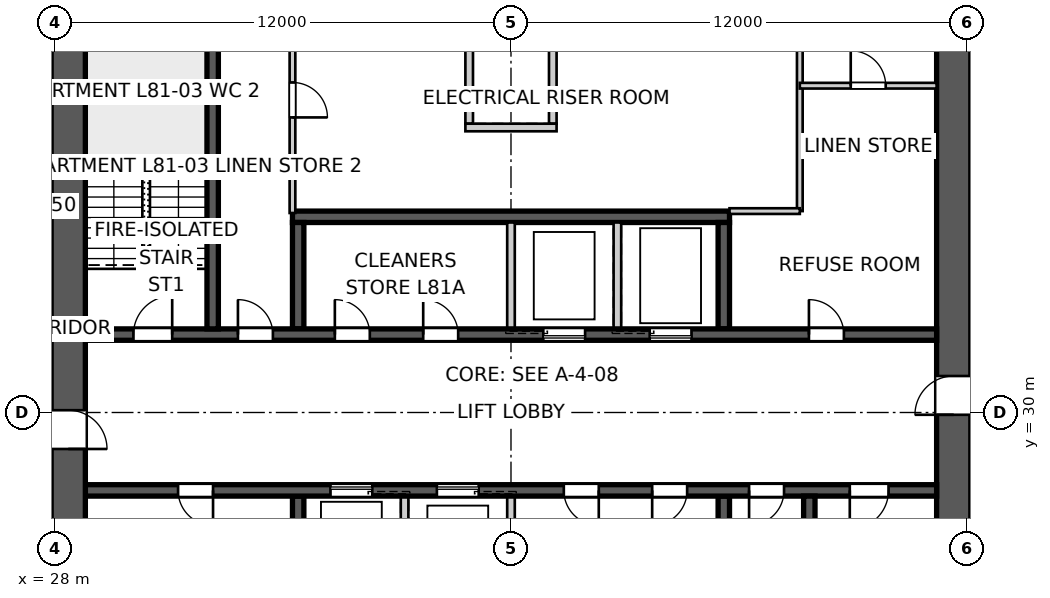
"""IFC4 building model, lengths in metres.
Left out: names, types, materials, properties, quantities, classifications, styles, units other than length and angle.
Written with IfcOpenShell. Run it as: python <this file> out.ifc"""

import sys

from ifc_helpers import new_model, si_unit, direction, frame, frame_2d, origin, place, context, subcontext, project, spatial, polyline, rectangle, outline, extrude, element, fill, save


model = new_model("IFC4")
c1 = context("Model", 3, precision=1e-05, world=origin(), true_north=direction((0.0, 1.0)))
c2 = subcontext(c1, "Body", "Model", "MODEL_VIEW")
j1 = project(units=[si_unit("LENGTHUNIT", "METRE"), si_unit("PLANEANGLEUNIT", "RADIAN")], contexts=[c1])
p1 = place(None, origin())
s1 = spatial("IfcSite", under=j1, at=p1, CompositionType="ELEMENT")
p2 = place(p1, origin())
s2 = spatial("IfcBuilding", under=s1, at=p2, CompositionType="ELEMENT")
p3 = place(p2, frame((0.0, 0.0, 293.0)))
s3 = spatial("IfcBuildingStorey", under=s2, at=p3, CompositionType="ELEMENT", Elevation=293.0)
p4 = place(p3, frame((51.65, 18.8, 0.0), z_axis=(0.0, 0.0, 1.0), x_axis=(0.0, 1.0, 0.0)))
e1 = element("IfcWall", 1, at=p4, inside=s3, PredefinedType="SHEAR", context=c2, shape_type="SweptSolid", body=[
    extrude(outline(polyline([(0.0, -0.45), (22.4, -0.45), (22.4, -0.025), (22.85, -0.025), (22.85, 0.025), (22.4, 0.025), (22.4, 0.45), (0.0, 0.45), (0.0, 0.025), (-0.45, 0.025), (-0.45, -0.025), (0.0, -0.025), (0.0, -0.45)])), origin(), (0.0, 0.0, 1.0), 3.4),
])
p5 = place(p4, frame((11.14, 0.0, 0.0)))
e2 = element("IfcOpeningElement", 2, at=p5, cuts=e1, PredefinedType="OPENING", context=c2, shape_type="SweptSolid", body=[
    extrude(rectangle(XDim=1.02, YDim=2.4, at=frame_2d((0.51, 1.2))), frame((0.0, 0.46, 0.0), z_axis=(0.0, -1.0, 0.0), x_axis=(1.0, 0.0, 0.0)), (0.0, 0.0, 1.0), 0.92),
])
p6 = place(p3, frame((28.35, 41.2, 0.0), z_axis=(0.0, 0.0, 1.0), x_axis=(0.0, -1.0, 0.0)))
e3 = element("IfcWall", 3, at=p6, inside=s3, PredefinedType="SHEAR", context=c2, shape_type="SweptSolid", body=[
    extrude(outline(polyline([(0.0, -0.45), (22.4, -0.45), (22.4, -0.025), (22.85, -0.025), (22.85, 0.025), (22.4, 0.025), (22.4, 0.45), (0.0, 0.45), (0.0, 0.025), (-0.45, 0.025), (-0.45, -0.025), (0.0, -0.025), (0.0, -0.45)])), origin(), (0.0, 0.0, 1.0), 3.4),
])
p7 = place(p6, frame((11.14, 0.0, 0.0)))
e4 = element("IfcOpeningElement", 4, at=p7, cuts=e3, PredefinedType="OPENING", context=c2, shape_type="SweptSolid", body=[
    extrude(rectangle(XDim=1.02, YDim=2.4, at=frame_2d((0.51, 1.2))), frame((0.0, 0.46, 0.0), z_axis=(0.0, -1.0, 0.0), x_axis=(1.0, 0.0, 0.0)), (0.0, 0.0, 1.0), 0.92),
])
p8 = place(p3, frame((28.8, 32.05, 0.0), z_axis=(0.0, 0.0, 1.0), x_axis=(1.0, 0.0, 0.0)))
e5 = element("IfcWall", 5, at=p8, inside=s3, PredefinedType="SHEAR", context=c2, shape_type="SweptSolid", body=[
    extrude(rectangle(XDim=22.4, YDim=0.3, at=frame_2d((11.2, 0.0))), origin(), (0.0, 0.0, 1.0), 3.4),
])
p9 = place(p8, frame((19.04, 0.0, 0.0)))
e6 = element("IfcOpeningElement", 6, at=p9, cuts=e5, PredefinedType="OPENING", context=c2, shape_type="SweptSolid", body=[
    extrude(rectangle(XDim=0.92, YDim=2.1, at=frame_2d((0.46, 1.05))), frame((0.0, 0.16, 0.0), z_axis=(0.0, -1.0, 0.0), x_axis=(1.0, 0.0, 0.0)), (0.0, 0.0, 1.0), 0.32),
])
p10 = place(p8, frame((1.265, 0.0, 0.0)))
e7 = element("IfcOpeningElement", 7, at=p10, cuts=e5, PredefinedType="OPENING", context=c2, shape_type="SweptSolid", body=[
    extrude(rectangle(XDim=1.02, YDim=2.1, at=frame_2d((0.51, 1.05))), frame((0.0, 0.16, 0.0), z_axis=(0.0, -1.0, 0.0), x_axis=(1.0, 0.0, 0.0)), (0.0, 0.0, 1.0), 0.32),
])
p11 = place(p8, frame((4.015, 0.0, 0.0)))
e8 = element("IfcOpeningElement", 8, at=p11, cuts=e5, PredefinedType="OPENING", context=c2, shape_type="SweptSolid", body=[
    extrude(rectangle(XDim=0.92, YDim=2.1, at=frame_2d((0.46, 1.05))), frame((0.0, 0.16, 0.0), z_axis=(0.0, -1.0, 0.0), x_axis=(1.0, 0.0, 0.0)), (0.0, 0.0, 1.0), 0.32),
])
p12 = place(p8, frame((6.565, 0.0, 0.0)))
e9 = element("IfcOpeningElement", 9, at=p12, cuts=e5, PredefinedType="OPENING", context=c2, shape_type="SweptSolid", body=[
    extrude(rectangle(XDim=0.92, YDim=2.1, at=frame_2d((0.46, 1.05))), frame((0.0, 0.16, 0.0), z_axis=(0.0, -1.0, 0.0), x_axis=(1.0, 0.0, 0.0)), (0.0, 0.0, 1.0), 0.32),
])
p13 = place(p8, frame((8.89, 0.0, 0.0)))
e10 = element("IfcOpeningElement", 10, at=p13, cuts=e5, PredefinedType="OPENING", context=c2, shape_type="SweptSolid", body=[
    extrude(rectangle(XDim=0.92, YDim=2.1, at=frame_2d((0.46, 1.05))), frame((0.0, 0.16, 0.0), z_axis=(0.0, -1.0, 0.0), x_axis=(1.0, 0.0, 0.0)), (0.0, 0.0, 1.0), 0.32),
])
p14 = place(p8, frame((12.05, 0.0, 0.0)))
e11 = element("IfcOpeningElement", 11, at=p14, cuts=e5, PredefinedType="OPENING", context=c2, shape_type="SweptSolid", body=[
    extrude(rectangle(XDim=1.1, YDim=2.1, at=frame_2d((0.55, 1.05))), frame((0.0, 0.16, 0.0), z_axis=(0.0, -1.0, 0.0), x_axis=(1.0, 0.0, 0.0)), (0.0, 0.0, 1.0), 0.32),
])
p15 = place(p8, frame((14.85, 0.0, 0.0)))
e12 = element("IfcOpeningElement", 12, at=p15, cuts=e5, PredefinedType="OPENING", context=c2, shape_type="SweptSolid", body=[
    extrude(rectangle(XDim=1.1, YDim=2.1, at=frame_2d((0.55, 1.05))), frame((0.0, 0.16, 0.0), z_axis=(0.0, -1.0, 0.0), x_axis=(1.0, 0.0, 0.0)), (0.0, 0.0, 1.0), 0.32),
])
p16 = place(p3, frame((51.2, 27.95, 0.0), z_axis=(0.0, 0.0, 1.0), x_axis=(-1.0, 0.0, 0.0)))
e13 = element("IfcWall", 13, at=p16, inside=s3, PredefinedType="SHEAR", context=c2, shape_type="SweptSolid", body=[
    extrude(rectangle(XDim=22.4, YDim=0.3, at=frame_2d((11.2, 0.0))), origin(), (0.0, 0.0, 1.0), 3.4),
])
p17 = place(p16, frame((19.04, 0.0, 0.0)))
e14 = element("IfcOpeningElement", 14, at=p17, cuts=e13, PredefinedType="OPENING", context=c2, shape_type="SweptSolid", body=[
    extrude(rectangle(XDim=0.92, YDim=2.1, at=frame_2d((0.46, 1.05))), frame((0.0, 0.16, 0.0), z_axis=(0.0, -1.0, 0.0), x_axis=(1.0, 0.0, 0.0)), (0.0, 0.0, 1.0), 0.32),
])
p18 = place(p16, frame((1.265, 0.0, 0.0)))
e15 = element("IfcOpeningElement", 15, at=p18, cuts=e13, PredefinedType="OPENING", context=c2, shape_type="SweptSolid", body=[
    extrude(rectangle(XDim=1.02, YDim=2.1, at=frame_2d((0.51, 1.05))), frame((0.0, 0.16, 0.0), z_axis=(0.0, -1.0, 0.0), x_axis=(1.0, 0.0, 0.0)), (0.0, 0.0, 1.0), 0.32),
])
p19 = place(p16, frame((4.015, 0.0, 0.0)))
e16 = element("IfcOpeningElement", 16, at=p19, cuts=e13, PredefinedType="OPENING", context=c2, shape_type="SweptSolid", body=[
    extrude(rectangle(XDim=0.92, YDim=2.1, at=frame_2d((0.46, 1.05))), frame((0.0, 0.16, 0.0), z_axis=(0.0, -1.0, 0.0), x_axis=(1.0, 0.0, 0.0)), (0.0, 0.0, 1.0), 0.32),
])
p20 = place(p16, frame((8.89, 0.0, 0.0)))
e17 = element("IfcOpeningElement", 17, at=p20, cuts=e13, PredefinedType="OPENING", context=c2, shape_type="SweptSolid", body=[
    extrude(rectangle(XDim=0.92, YDim=2.1, at=frame_2d((0.46, 1.05))), frame((0.0, 0.16, 0.0), z_axis=(0.0, -1.0, 0.0), x_axis=(1.0, 0.0, 0.0)), (0.0, 0.0, 1.0), 0.32),
])
p21 = place(p16, frame((6.565, 0.0, 0.0)))
e18 = element("IfcOpeningElement", 18, at=p21, cuts=e13, PredefinedType="OPENING", context=c2, shape_type="SweptSolid", body=[
    extrude(rectangle(XDim=0.92, YDim=2.1, at=frame_2d((0.46, 1.05))), frame((0.0, 0.16, 0.0), z_axis=(0.0, -1.0, 0.0), x_axis=(1.0, 0.0, 0.0)), (0.0, 0.0, 1.0), 0.32),
])
p22 = place(p16, frame((12.05, 0.0, 0.0)))
e19 = element("IfcOpeningElement", 19, at=p22, cuts=e13, PredefinedType="OPENING", context=c2, shape_type="SweptSolid", body=[
    extrude(rectangle(XDim=1.1, YDim=2.1, at=frame_2d((0.55, 1.05))), frame((0.0, 0.16, 0.0), z_axis=(0.0, -1.0, 0.0), x_axis=(1.0, 0.0, 0.0)), (0.0, 0.0, 1.0), 0.32),
])
p23 = place(p16, frame((14.85, 0.0, 0.0)))
e20 = element("IfcOpeningElement", 20, at=p23, cuts=e13, PredefinedType="OPENING", context=c2, shape_type="SweptSolid", body=[
    extrude(rectangle(XDim=1.1, YDim=2.1, at=frame_2d((0.55, 1.05))), frame((0.0, 0.16, 0.0), z_axis=(0.0, -1.0, 0.0), x_axis=(1.0, 0.0, 0.0)), (0.0, 0.0, 1.0), 0.32),
])
p24 = place(p3, frame((34.25, 35.15, 0.0), z_axis=(0.0, 0.0, 1.0), x_axis=(1.0, 0.0, 0.0)))
e21 = element("IfcWall", 21, at=p24, inside=s3, PredefinedType="SHEAR", context=c2, shape_type="SweptSolid", body=[
    extrude(rectangle(XDim=11.5, YDim=0.3, at=frame_2d((5.75, 0.0))), origin(), (0.0, 0.0, 1.0), 3.4),
])
for number, where, z_axis, x_axis in (
    (22, (34.4, 32.2, 0.0), (0.0, 0.0, 1.0), (0.0, 1.0, 0.0)),
    (23, (45.6, 27.8, 0.0), (0.0, 0.0, 1.0), (0.0, -1.0, 0.0)),
):
    element("IfcWall", number, at=place(p3, frame(where, z_axis=z_axis, x_axis=x_axis)), inside=s3, PredefinedType="SHEAR", context=c2, shape_type="SweptSolid", body=[
        extrude(rectangle(XDim=2.8, YDim=0.3, at=frame_2d((1.4, 0.0))), origin(), (0.0, 0.0, 1.0), 3.4),
    ])
for number, where, z_axis, x_axis in (
    (24, (40.0, 32.2, 0.0), (0.0, 0.0, 1.0), (0.0, 1.0, 0.0)),
    (25, (40.0, 27.8, 0.0), (0.0, 0.0, 1.0), (0.0, -1.0, 0.0)),
    (26, (42.8, 32.2, 0.0), (0.0, 0.0, 1.0), (0.0, 1.0, 0.0)),
    (27, (37.2, 27.8, 0.0), (0.0, 0.0, 1.0), (0.0, -1.0, 0.0)),
):
    element("IfcWall", number, at=place(p3, frame(where, z_axis=z_axis, x_axis=x_axis)), inside=s3, PredefinedType="SOLIDWALL", context=c2, shape_type="SweptSolid", body=[
        extrude(rectangle(XDim=2.8, YDim=0.2, at=frame_2d((1.4, 0.0))), origin(), (0.0, 0.0, 1.0), 3.4),
    ])
for number, where, z_axis, x_axis in (
    (28, (45.6, 32.2, 0.0), (0.0, 0.0, 1.0), (0.0, 1.0, 0.0)),
    (29, (34.4, 27.8, 0.0), (0.0, 0.0, 1.0), (0.0, -1.0, 0.0)),
):
    element("IfcWall", number, at=place(p3, frame(where, z_axis=z_axis, x_axis=x_axis)), inside=s3, PredefinedType="SHEAR", context=c2, shape_type="SweptSolid", body=[
        extrude(rectangle(XDim=2.8, YDim=0.3, at=frame_2d((1.4, 0.0))), origin(), (0.0, 0.0, 1.0), 3.4),
    ])
for number, where, z_axis, x_axis in (
    (30, (32.15, 32.2, 0.0), (0.0, 0.0, 1.0), (0.0, 1.0, 0.0)),
    (31, (47.85, 27.8, 0.0), (0.0, 0.0, 1.0), (0.0, -1.0, 0.0)),
):
    element("IfcWall", number, at=place(p3, frame(where, z_axis=z_axis, x_axis=x_axis)), inside=s3, PredefinedType="SHEAR", context=c2, shape_type="SweptSolid", body=[
        extrude(rectangle(XDim=7.7, YDim=0.3, at=frame_2d((3.85, 0.0))), origin(), (0.0, 0.0, 1.0), 3.4),
    ])
for number, where, z_axis, x_axis in (
    (32, (38.9, 37.6, 0.0), (0.0, 0.0, 1.0), (0.0, 1.0, 0.0)),
    (33, (41.1, 37.6, 0.0), (0.0, 0.0, 1.0), (0.0, 1.0, 0.0)),
):
    element("IfcWall", number, at=place(p3, frame(where, z_axis=z_axis, x_axis=x_axis)), inside=s3, PredefinedType="SOLIDWALL", context=c2, shape_type="SweptSolid", body=[
        extrude(rectangle(XDim=2.0, YDim=0.2, at=frame_2d((1.0, 0.0))), origin(), (0.0, 0.0, 1.0), 3.4),
    ])
p25 = place(p3, frame((38.8, 37.5, 0.0), z_axis=(0.0, 0.0, 1.0), x_axis=(1.0, 0.0, 0.0)))
e34 = element("IfcWall", 34, at=p25, inside=s3, PredefinedType="SOLIDWALL", context=c2, shape_type="SweptSolid", body=[
    extrude(rectangle(XDim=2.4, YDim=0.2, at=frame_2d((1.2, 0.0))), origin(), (0.0, 0.0, 1.0), 3.4),
])
p26 = place(p3, frame((34.25, 41.2, 0.0), z_axis=(0.0, 0.0, 1.0), x_axis=(0.0, -1.0, 0.0)))
e35 = element("IfcWall", 35, at=p26, inside=s3, PredefinedType="SOLIDWALL", context=c2, shape_type="SweptSolid", body=[
    extrude(rectangle(XDim=5.95, YDim=0.15, at=frame_2d((2.975, 0.0))), origin(), (0.0, 0.0, 1.0), 3.25),
])
p27 = place(p26, frame((2.515, 0.0, 0.0)))
e36 = element("IfcOpeningElement", 36, at=p27, cuts=e35, PredefinedType="OPENING", context=c2, shape_type="SweptSolid", body=[
    extrude(rectangle(XDim=0.92, YDim=2.1, at=frame_2d((0.46, 1.05))), frame((0.0, 0.085, 0.0), z_axis=(0.0, -1.0, 0.0), x_axis=(1.0, 0.0, 0.0)), (0.0, 0.0, 1.0), 0.17),
])
p28 = place(p3, frame((47.6, 41.2, 0.0), z_axis=(0.0, 0.0, 1.0), x_axis=(0.0, -1.0, 0.0)))
e37 = element("IfcWall", 37, at=p28, inside=s3, PredefinedType="SOLIDWALL", context=c2, shape_type="SweptSolid", body=[
    extrude(rectangle(XDim=5.9, YDim=0.15, at=frame_2d((2.95, 0.0))), origin(), (0.0, 0.0, 1.0), 3.25),
])
p29 = place(p3, frame((47.6, 35.3, 0.0), z_axis=(0.0, 0.0, 1.0), x_axis=(-1.0, 0.0, 0.0)))
e38 = element("IfcWall", 38, at=p29, inside=s3, PredefinedType="SOLIDWALL", context=c2, shape_type="SweptSolid", body=[
    extrude(rectangle(XDim=1.85, YDim=0.15, at=frame_2d((0.925, 0.0))), origin(), (0.0, 0.0, 1.0), 3.25),
])
p30 = place(p3, frame((47.6, 38.6, 0.0), z_axis=(0.0, 0.0, 1.0), x_axis=(1.0, 0.0, 0.0)))
e39 = element("IfcWall", 39, at=p30, inside=s3, PredefinedType="SOLIDWALL", context=c2, shape_type="SweptSolid", body=[
    extrude(rectangle(XDim=3.6, YDim=0.15, at=frame_2d((1.8, 0.0))), origin(), (0.0, 0.0, 1.0), 3.25),
])
p31 = place(p30, frame((1.34, 0.0, 0.0)))
e40 = element("IfcOpeningElement", 40, at=p31, cuts=e39, PredefinedType="OPENING", context=c2, shape_type="SweptSolid", body=[
    extrude(rectangle(XDim=0.92, YDim=2.1, at=frame_2d((0.46, 1.05))), frame((0.0, 0.085, 0.0), z_axis=(0.0, -1.0, 0.0), x_axis=(1.0, 0.0, 0.0)), (0.0, 0.0, 1.0), 0.17),
])
p32 = place(p9, origin())
e41 = element("IfcDoor", 41, at=p32, inside=s3, OperationType="SINGLE_SWING_LEFT", PredefinedType="DOOR", context=c2, shape_type="SweptSolid", body=[
    extrude(rectangle(XDim=0.92, YDim=2.1, at=frame_2d((0.46, 1.05))), frame((0.0, 0.025, 0.0), z_axis=(0.0, -1.0, 0.0), x_axis=(1.0, 0.0, 0.0)), (0.0, 0.0, 1.0), 0.05),
])
fill(e6, e41)
p33 = place(p17, origin())
e42 = element("IfcDoor", 42, at=p33, inside=s3, OperationType="SINGLE_SWING_LEFT", PredefinedType="DOOR", context=c2, shape_type="SweptSolid", body=[
    extrude(rectangle(XDim=0.92, YDim=2.1, at=frame_2d((0.46, 1.05))), frame((0.0, 0.025, 0.0), z_axis=(0.0, -1.0, 0.0), x_axis=(1.0, 0.0, 0.0)), (0.0, 0.0, 1.0), 0.05),
])
fill(e14, e42)
p34 = place(p18, origin())
e43 = element("IfcDoor", 43, at=p34, inside=s3, OperationType="SINGLE_SWING_RIGHT", PredefinedType="DOOR", context=c2, shape_type="SweptSolid", body=[
    extrude(rectangle(XDim=1.02, YDim=2.1, at=frame_2d((0.51, 1.05))), frame((0.0, 0.025, 0.0), z_axis=(0.0, -1.0, 0.0), x_axis=(1.0, 0.0, 0.0)), (0.0, 0.0, 1.0), 0.05),
])
fill(e15, e43)
p35 = place(p10, origin())
e44 = element("IfcDoor", 44, at=p35, inside=s3, OperationType="SINGLE_SWING_RIGHT", PredefinedType="DOOR", context=c2, shape_type="SweptSolid", body=[
    extrude(rectangle(XDim=1.02, YDim=2.1, at=frame_2d((0.51, 1.05))), frame((0.0, 0.025, 0.0), z_axis=(0.0, -1.0, 0.0), x_axis=(1.0, 0.0, 0.0)), (0.0, 0.0, 1.0), 0.05),
])
fill(e7, e44)
p36 = place(p11, origin())
e45 = element("IfcDoor", 45, at=p36, inside=s3, OperationType="SINGLE_SWING_LEFT", PredefinedType="DOOR", context=c2, shape_type="SweptSolid", body=[
    extrude(rectangle(XDim=0.92, YDim=2.1, at=frame_2d((0.46, 1.05))), frame((0.0, 0.025, 0.0), z_axis=(0.0, -1.0, 0.0), x_axis=(1.0, 0.0, 0.0)), (0.0, 0.0, 1.0), 0.05),
])
fill(e8, e45)
p37 = place(p19, origin())
e46 = element("IfcDoor", 46, at=p37, inside=s3, OperationType="SINGLE_SWING_RIGHT", PredefinedType="DOOR", context=c2, shape_type="SweptSolid", body=[
    extrude(rectangle(XDim=0.92, YDim=2.1, at=frame_2d((0.46, 1.05))), frame((0.0, 0.025, 0.0), z_axis=(0.0, -1.0, 0.0), x_axis=(1.0, 0.0, 0.0)), (0.0, 0.0, 1.0), 0.05),
])
fill(e16, e46)
p38 = place(p31, origin())
e47 = element("IfcDoor", 47, at=p38, inside=s3, OperationType="SINGLE_SWING_LEFT", PredefinedType="DOOR", context=c2, shape_type="SweptSolid", body=[
    extrude(rectangle(XDim=0.92, YDim=2.1, at=frame_2d((0.46, 1.05))), frame((0.0, 0.025, 0.0), z_axis=(0.0, -1.0, 0.0), x_axis=(1.0, 0.0, 0.0)), (0.0, 0.0, 1.0), 0.05),
])
fill(e40, e47)
p39 = place(p27, origin())
e48 = element("IfcDoor", 48, at=p39, inside=s3, OperationType="SINGLE_SWING_RIGHT", PredefinedType="DOOR", context=c2, shape_type="SweptSolid", body=[
    extrude(rectangle(XDim=0.92, YDim=2.1, at=frame_2d((0.46, 1.05))), frame((0.0, 0.025, 0.0), z_axis=(0.0, -1.0, 0.0), x_axis=(1.0, 0.0, 0.0)), (0.0, 0.0, 1.0), 0.05),
])
fill(e36, e48)
p40 = place(p12, origin())
e49 = element("IfcDoor", 49, at=p40, inside=s3, OperationType="SINGLE_SWING_LEFT", PredefinedType="DOOR", context=c2, shape_type="SweptSolid", body=[
    extrude(rectangle(XDim=0.92, YDim=2.1, at=frame_2d((0.46, 1.05))), frame((0.0, 0.025, 0.0), z_axis=(0.0, -1.0, 0.0), x_axis=(1.0, 0.0, 0.0)), (0.0, 0.0, 1.0), 0.05),
])
fill(e9, e49)
p41 = place(p13, origin())
e50 = element("IfcDoor", 50, at=p41, inside=s3, OperationType="SINGLE_SWING_LEFT", PredefinedType="DOOR", context=c2, shape_type="SweptSolid", body=[
    extrude(rectangle(XDim=0.92, YDim=2.1, at=frame_2d((0.46, 1.05))), frame((0.0, 0.025, 0.0), z_axis=(0.0, -1.0, 0.0), x_axis=(1.0, 0.0, 0.0)), (0.0, 0.0, 1.0), 0.05),
])
fill(e10, e50)
p42 = place(p20, origin())
e51 = element("IfcDoor", 51, at=p42, inside=s3, OperationType="SINGLE_SWING_LEFT", PredefinedType="DOOR", context=c2, shape_type="SweptSolid", body=[
    extrude(rectangle(XDim=0.92, YDim=2.1, at=frame_2d((0.46, 1.05))), frame((0.0, 0.025, 0.0), z_axis=(0.0, -1.0, 0.0), x_axis=(1.0, 0.0, 0.0)), (0.0, 0.0, 1.0), 0.05),
])
fill(e17, e51)
p43 = place(p21, origin())
e52 = element("IfcDoor", 52, at=p43, inside=s3, OperationType="SINGLE_SWING_RIGHT", PredefinedType="DOOR", context=c2, shape_type="SweptSolid", body=[
    extrude(rectangle(XDim=0.92, YDim=2.1, at=frame_2d((0.46, 1.05))), frame((0.0, 0.025, 0.0), z_axis=(0.0, -1.0, 0.0), x_axis=(1.0, 0.0, 0.0)), (0.0, 0.0, 1.0), 0.05),
])
fill(e18, e52)
p44 = place(p5, origin())
e53 = element("IfcDoor", 53, at=p44, inside=s3, OperationType="SINGLE_SWING_LEFT", PredefinedType="DOOR", context=c2, shape_type="SweptSolid", body=[
    extrude(rectangle(XDim=1.02, YDim=2.4, at=frame_2d((0.51, 1.2))), frame((0.0, 0.025, 0.0), z_axis=(0.0, -1.0, 0.0), x_axis=(1.0, 0.0, 0.0)), (0.0, 0.0, 1.0), 0.05),
])
fill(e2, e53)
p45 = place(p7, origin())
e54 = element("IfcDoor", 54, at=p45, inside=s3, OperationType="SINGLE_SWING_RIGHT", PredefinedType="DOOR", context=c2, shape_type="SweptSolid", body=[
    extrude(rectangle(XDim=1.02, YDim=2.4, at=frame_2d((0.51, 1.2))), frame((0.0, 0.025, 0.0), z_axis=(0.0, -1.0, 0.0), x_axis=(1.0, 0.0, 0.0)), (0.0, 0.0, 1.0), 0.05),
])
fill(e4, e54)
p46 = place(p14, origin())
e55 = element("IfcDoor", 55, at=p46, inside=s3, OperationType="SLIDING_TO_LEFT", PredefinedType="DOOR", context=c2, shape_type="SweptSolid", body=[
    extrude(rectangle(XDim=1.1, YDim=2.1, at=frame_2d((0.55, 1.05))), frame((0.0, 0.025, 0.0), z_axis=(0.0, -1.0, 0.0), x_axis=(1.0, 0.0, 0.0)), (0.0, 0.0, 1.0), 0.05),
])
fill(e11, e55)
p47 = place(p22, origin())
e56 = element("IfcDoor", 56, at=p47, inside=s3, OperationType="SLIDING_TO_LEFT", PredefinedType="DOOR", context=c2, shape_type="SweptSolid", body=[
    extrude(rectangle(XDim=1.1, YDim=2.1, at=frame_2d((0.55, 1.05))), frame((0.0, 0.025, 0.0), z_axis=(0.0, -1.0, 0.0), x_axis=(1.0, 0.0, 0.0)), (0.0, 0.0, 1.0), 0.05),
])
fill(e19, e56)
p48 = place(p15, origin())
e57 = element("IfcDoor", 57, at=p48, inside=s3, OperationType="SLIDING_TO_LEFT", PredefinedType="DOOR", context=c2, shape_type="SweptSolid", body=[
    extrude(rectangle(XDim=1.1, YDim=2.1, at=frame_2d((0.55, 1.05))), frame((0.0, 0.025, 0.0), z_axis=(0.0, -1.0, 0.0), x_axis=(1.0, 0.0, 0.0)), (0.0, 0.0, 1.0), 0.05),
])
fill(e12, e57)
p49 = place(p23, origin())
e58 = element("IfcDoor", 58, at=p49, inside=s3, OperationType="SLIDING_TO_LEFT", PredefinedType="DOOR", context=c2, shape_type="SweptSolid", body=[
    extrude(rectangle(XDim=1.1, YDim=2.1, at=frame_2d((0.55, 1.05))), frame((0.0, 0.025, 0.0), z_axis=(0.0, -1.0, 0.0), x_axis=(1.0, 0.0, 0.0)), (0.0, 0.0, 1.0), 0.05),
])
fill(e20, e58)
save(model, sys.argv[1])
